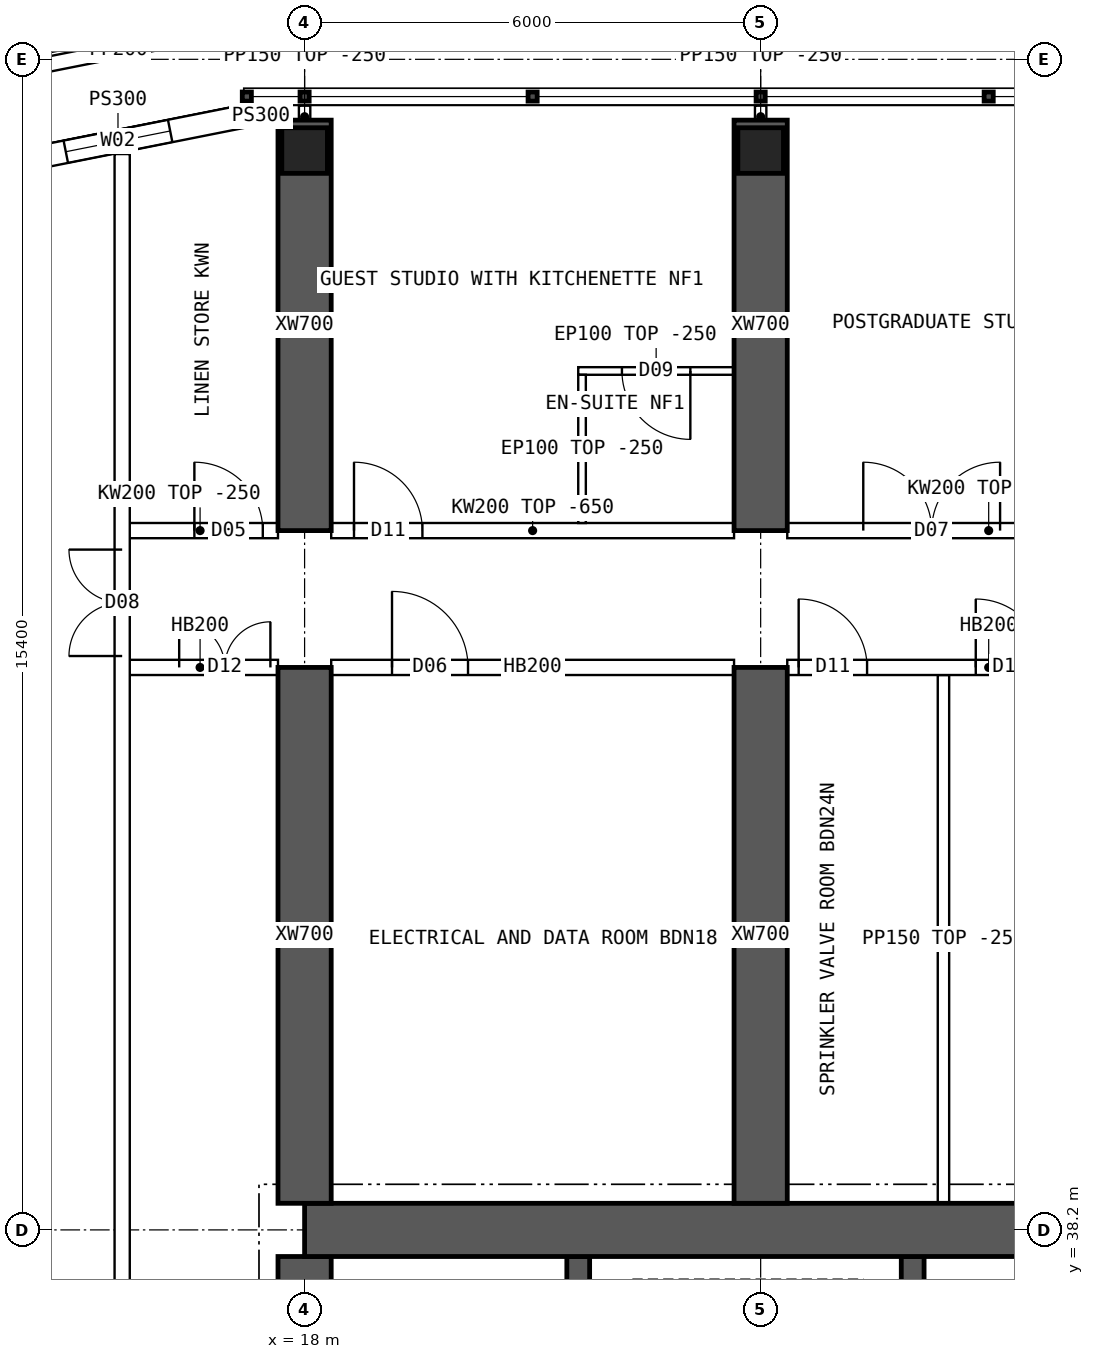
"""IFC4 building model, lengths in metres.
Left out: names, types, materials, properties, quantities, classifications, styles, units other than length and angle.
Written with IfcOpenShell. Run it as: python <this file> out.ifc"""

import sys

from ifc_helpers import new_model, si_unit, direction, frame, frame_2d, origin, origin_2d, place, context, subcontext, project, spatial, polyline, rectangle, hollow_rectangle, outline, extrude, element, fill, save


model = new_model("IFC4")
c1 = context("Model", 3, precision=1e-05, world=origin(), true_north=direction((0.0, 1.0)))
c2 = subcontext(c1, "Body", "Model", "MODEL_VIEW")
j1 = project(units=[si_unit("LENGTHUNIT", "METRE"), si_unit("PLANEANGLEUNIT", "RADIAN")], contexts=[c1])
p1 = place(None, origin())
s1 = spatial("IfcSite", under=j1, at=p1, CompositionType="ELEMENT")
p2 = place(p1, origin())
s2 = spatial("IfcBuilding", under=s1, at=p2, CompositionType="ELEMENT")
p3 = place(p2, frame((0.0, 0.0, 208.3)))
s3 = spatial("IfcBuildingStorey", under=s2, at=p3, CompositionType="ELEMENT", Elevation=208.3)
for number, where, z_axis, x_axis in (
    (1, (18.0, 52.4, 0.0), (0.0, 0.0, 1.0), (1.0, 0.0, 0.0)),
    (2, (24.0, 52.4, 0.0), (0.0, 0.0, 1.0), (1.0, 0.0, 0.0)),
):
    element("IfcColumn", number, at=place(p3, frame(where, z_axis=z_axis, x_axis=x_axis)), inside=s3, PredefinedType="COLUMN", context=c2, shape_type="SweptSolid", body=[
        extrude(hollow_rectangle(XDim=0.6, YDim=0.6, WallThickness=0.06, at=origin_2d()), origin(), (0.0, 0.0, 1.0), 4.5),
    ])
p4 = place(p3, frame((18.0, 38.2, 0.0), z_axis=(0.0, 0.0, 1.0), x_axis=(1.0, 0.0, 0.0)))
e3 = element("IfcWall", 3, at=p4, inside=s3, PredefinedType="SHEAR", context=c2, shape_type="SweptSolid", body=[
    extrude(rectangle(XDim=48.0, YDim=0.7, at=frame_2d((24.0, 0.0))), origin(), (0.0, 0.0, 1.0), 4.5),
])
p5 = place(p3, frame((18.0, 26.15, 0.0), z_axis=(0.0, 0.0, 1.0), x_axis=(0.0, 1.0, 0.0)))
e4 = element("IfcWall", 4, at=p5, inside=s3, PredefinedType="SHEAR", context=c2, shape_type="SweptSolid", body=[
    extrude(rectangle(XDim=11.7, YDim=0.7, at=frame_2d((5.85, 0.0))), origin(), (0.0, 0.0, 1.0), 4.5),
])
p6 = place(p5, frame((5.15, 0.0, 0.0)))
e5 = element("IfcOpeningElement", 5, at=p6, cuts=e4, PredefinedType="OPENING", context=c2, shape_type="SweptSolid", body=[
    extrude(rectangle(XDim=1.2, YDim=2.1, at=frame_2d((0.6, 1.05))), frame((0.0, 0.36, 0.0), z_axis=(0.0, -1.0, 0.0), x_axis=(1.0, 0.0, 0.0)), (0.0, 0.0, 1.0), 0.72),
])
for number, where, z_axis, x_axis in (
    (6, (21.6, 34.75, 0.0), (0.0, 0.0, 1.0), (0.0, 1.0, 0.0)),
    (7, (26.0, 34.75, 0.0), (0.0, 0.0, 1.0), (0.0, 1.0, 0.0)),
):
    element("IfcWall", number, at=place(p3, frame(where, z_axis=z_axis, x_axis=x_axis)), inside=s3, PredefinedType="SHEAR", context=c2, shape_type="SweptSolid", body=[
        extrude(rectangle(XDim=3.1, YDim=0.3, at=frame_2d((1.55, 0.0))), origin(), (0.0, 0.0, 1.0), 4.5),
    ])
p7 = place(p3, frame((18.0, 47.4, 0.0), z_axis=(0.0, 0.0, 1.0), x_axis=(0.0, 1.0, 0.0)))
e8 = element("IfcWall", 8, at=p7, inside=s3, PredefinedType="SHEAR", context=c2, shape_type="SweptSolid", body=[
    extrude(rectangle(XDim=5.4, YDim=0.7, at=frame_2d((2.7, 0.0))), origin(), (0.0, 0.0, 1.0), 4.5),
])
p8 = place(p3, frame((18.0, 38.55, 0.0), z_axis=(0.0, 0.0, 1.0), x_axis=(0.0, 1.0, 0.0)))
e9 = element("IfcWall", 9, at=p8, inside=s3, PredefinedType="SHEAR", context=c2, shape_type="SweptSolid", body=[
    extrude(rectangle(XDim=7.05, YDim=0.7, at=frame_2d((3.525, 0.0))), origin(), (0.0, 0.0, 1.0), 4.5),
])
p9 = place(p3, frame((24.0, 47.4, 0.0), z_axis=(0.0, 0.0, 1.0), x_axis=(0.0, 1.0, 0.0)))
e10 = element("IfcWall", 10, at=p9, inside=s3, PredefinedType="SHEAR", context=c2, shape_type="SweptSolid", body=[
    extrude(rectangle(XDim=5.4, YDim=0.7, at=frame_2d((2.7, 0.0))), origin(), (0.0, 0.0, 1.0), 4.5),
])
p10 = place(p3, frame((24.0, 38.55, 0.0), z_axis=(0.0, 0.0, 1.0), x_axis=(0.0, 1.0, 0.0)))
e11 = element("IfcWall", 11, at=p10, inside=s3, PredefinedType="SHEAR", context=c2, shape_type="SweptSolid", body=[
    extrude(rectangle(XDim=7.05, YDim=0.7, at=frame_2d((3.525, 0.0))), origin(), (0.0, 0.0, 1.0), 4.5),
])
p11 = place(p3, frame((17.2, 52.85, 0.0), z_axis=(0.0, 0.0, 1.0), x_axis=(-0.98078325777, -0.195100490205, 0.0)))
e12 = element("IfcWall", 12, at=p11, inside=s3, PredefinedType="SOLIDWALL", context=c2, shape_type="SweptSolid", body=[
    extrude(outline(polyline([(-0.03, -0.15), (3.405, -0.15), (3.345, 0.15), (0.03, 0.15), (-0.03, -0.15)])), origin(), (0.0, 0.0, 1.0), 4.25),
])
p12 = place(p11, frame((0.988, 0.0, 0.9)))
e13 = element("IfcOpeningElement", 13, at=p12, cuts=e12, PredefinedType="OPENING", context=c2, shape_type="SweptSolid", body=[
    extrude(rectangle(XDim=1.4, YDim=1.8, at=frame_2d((0.7, 0.9))), frame((0.0, 0.16, 0.0), z_axis=(0.0, -1.0, 0.0), x_axis=(1.0, 0.0, 0.0)), (0.0, 0.0, 1.0), 0.32),
])
p13 = place(p3, frame((17.2, 52.85, 0.0), z_axis=(0.0, 0.0, 1.0), x_axis=(1.0, 0.0, 0.0)))
e14 = element("IfcWall", 14, at=p13, inside=s3, PredefinedType="SOLIDWALL", context=c2, shape_type="SweptSolid", body=[
    extrude(rectangle(XDim=0.45, YDim=0.3, at=frame_2d((0.225, 0.0))), origin(), (0.0, 0.0, 1.0), 4.25),
])
p14 = place(p3, frame((13.891, 53.389, 0.0), z_axis=(0.0, 0.0, 1.0), x_axis=(0.980787925163, 0.195077025438, 0.0)))
e15 = element("IfcWall", 15, at=p14, inside=s3, PredefinedType="PARAPET", context=c2, shape_type="SweptSolid", body=[
    extrude(rectangle(XDim=3.389, YDim=0.2, at=frame_2d((1.695, 0.0))), origin(), (0.0, 0.0, 1.0), 1.1),
])
p15 = place(p3, frame((15.6, 47.4, 0.0), z_axis=(0.0, 0.0, 1.0), x_axis=(1.0, 0.0, 0.0)))
e16 = element("IfcWall", 16, at=p15, inside=s3, PredefinedType="SOLIDWALL", context=c2, shape_type="SweptSolid", body=[
    extrude(rectangle(XDim=2.05, YDim=0.2, at=frame_2d((1.025, 0.0))), origin(), (0.0, 0.0, 1.0), 4.25),
])
p16 = place(p15, frame((0.95, 0.0, 0.0)))
e17 = element("IfcOpeningElement", 17, at=p16, cuts=e16, PredefinedType="OPENING", context=c2, shape_type="SweptSolid", body=[
    extrude(rectangle(XDim=0.9, YDim=2.1, at=frame_2d((0.45, 1.05))), frame((0.0, 0.11, 0.0), z_axis=(0.0, -1.0, 0.0), x_axis=(1.0, 0.0, 0.0)), (0.0, 0.0, 1.0), 0.22),
])
p17 = place(p3, frame((15.6, 45.6, 0.0), z_axis=(0.0, 0.0, 1.0), x_axis=(1.0, 0.0, 0.0)))
e18 = element("IfcWall", 18, at=p17, inside=s3, PredefinedType="SOLIDWALL", context=c2, shape_type="SweptSolid", body=[
    extrude(rectangle(XDim=2.05, YDim=0.2, at=frame_2d((1.025, 0.0))), origin(), (0.0, 0.0, 1.0), 4.25),
])
p18 = place(p17, frame((0.75, 0.0, 0.0)))
e19 = element("IfcOpeningElement", 19, at=p18, cuts=e18, PredefinedType="OPENING", context=c2, shape_type="SweptSolid", body=[
    extrude(rectangle(XDim=1.2, YDim=2.1, at=frame_2d((0.6, 1.05))), frame((0.0, 0.11, 0.0), z_axis=(0.0, -1.0, 0.0), x_axis=(1.0, 0.0, 0.0)), (0.0, 0.0, 1.0), 0.22),
])
p19 = place(p3, frame((18.35, 47.4, 0.0), z_axis=(0.0, 0.0, 1.0), x_axis=(1.0, 0.0, 0.0)))
e20 = element("IfcWall", 20, at=p19, inside=s3, PredefinedType="SOLIDWALL", context=c2, shape_type="SweptSolid", body=[
    extrude(outline(polyline([(0.0, 0.0), (5.3, 0.0), (5.3, 3.85), (0.0, 3.85), (0.0, 0.0)])), frame((0.0, 0.1, 0.0), z_axis=(0.0, -1.0, 0.0), x_axis=(1.0, 0.0, 0.0)), (0.0, 0.0, 1.0), 0.2),
])
p20 = place(p19, frame((0.3, 0.0, 0.0)))
e21 = element("IfcOpeningElement", 21, at=p20, cuts=e20, PredefinedType="OPENING", context=c2, shape_type="SweptSolid", body=[
    extrude(rectangle(XDim=0.9, YDim=2.1, at=frame_2d((0.45, 1.05))), frame((0.0, 0.11, 0.0), z_axis=(0.0, -1.0, 0.0), x_axis=(1.0, 0.0, 0.0)), (0.0, 0.0, 1.0), 0.22),
])
p21 = place(p3, frame((18.35, 45.6, 0.0), z_axis=(0.0, 0.0, 1.0), x_axis=(1.0, 0.0, 0.0)))
e22 = element("IfcWall", 22, at=p21, inside=s3, PredefinedType="SOLIDWALL", context=c2, shape_type="SweptSolid", body=[
    extrude(rectangle(XDim=5.3, YDim=0.2, at=frame_2d((2.65, 0.0))), origin(), (0.0, 0.0, 1.0), 4.25),
])
p22 = place(p21, frame((0.8, 0.0, 0.0)))
e23 = element("IfcOpeningElement", 23, at=p22, cuts=e22, PredefinedType="OPENING", context=c2, shape_type="SweptSolid", body=[
    extrude(rectangle(XDim=1.0, YDim=2.1, at=frame_2d((0.5, 1.05))), frame((0.0, 0.11, 0.0), z_axis=(0.0, -1.0, 0.0), x_axis=(1.0, 0.0, 0.0)), (0.0, 0.0, 1.0), 0.22),
])
p23 = place(p3, frame((24.35, 47.4, 0.0), z_axis=(0.0, 0.0, 1.0), x_axis=(1.0, 0.0, 0.0)))
e24 = element("IfcWall", 24, at=p23, inside=s3, PredefinedType="SOLIDWALL", context=c2, shape_type="SweptSolid", body=[
    extrude(outline(polyline([(0.0, 0.0), (5.3, 0.0), (5.3, 3.85), (0.0, 3.85), (0.0, 0.0)])), frame((0.0, 0.1, 0.0), z_axis=(0.0, -1.0, 0.0), x_axis=(1.0, 0.0, 0.0)), (0.0, 0.0, 1.0), 0.2),
])
p24 = place(p23, frame((1.0, 0.0, 0.0)))
e25 = element("IfcOpeningElement", 25, at=p24, cuts=e24, PredefinedType="OPENING", context=c2, shape_type="SweptSolid", body=[
    extrude(rectangle(XDim=1.8, YDim=2.1, at=frame_2d((0.9, 1.05))), frame((0.0, 0.11, 0.0), z_axis=(0.0, -1.0, 0.0), x_axis=(1.0, 0.0, 0.0)), (0.0, 0.0, 1.0), 0.22),
])
p25 = place(p3, frame((24.35, 45.6, 0.0), z_axis=(0.0, 0.0, 1.0), x_axis=(1.0, 0.0, 0.0)))
e26 = element("IfcWall", 26, at=p25, inside=s3, PredefinedType="SOLIDWALL", context=c2, shape_type="SweptSolid", body=[
    extrude(rectangle(XDim=5.3, YDim=0.2, at=frame_2d((2.65, 0.0))), origin(), (0.0, 0.0, 1.0), 4.25),
])
p26 = place(p25, frame((0.15, 0.0, 0.0)))
e27 = element("IfcOpeningElement", 27, at=p26, cuts=e26, PredefinedType="OPENING", context=c2, shape_type="SweptSolid", body=[
    extrude(rectangle(XDim=0.9, YDim=2.1, at=frame_2d((0.45, 1.05))), frame((0.0, 0.11, 0.0), z_axis=(0.0, -1.0, 0.0), x_axis=(1.0, 0.0, 0.0)), (0.0, 0.0, 1.0), 0.22),
])
p27 = place(p25, frame((2.48, 0.0, 0.0)))
e28 = element("IfcOpeningElement", 28, at=p27, cuts=e26, PredefinedType="OPENING", context=c2, shape_type="SweptSolid", body=[
    extrude(rectangle(XDim=0.9, YDim=2.1, at=frame_2d((0.45, 1.05))), frame((0.0, 0.11, 0.0), z_axis=(0.0, -1.0, 0.0), x_axis=(1.0, 0.0, 0.0)), (0.0, 0.0, 1.0), 0.22),
])
p28 = place(p3, frame((21.6, 49.5, 0.0), z_axis=(0.0, 0.0, 1.0), x_axis=(1.0, 0.0, 0.0)))
e29 = element("IfcWall", 29, at=p28, inside=s3, PredefinedType="PARTITIONING", context=c2, shape_type="SweptSolid", body=[
    extrude(rectangle(XDim=2.05, YDim=0.1, at=frame_2d((1.025, 0.0))), origin(), (0.0, 0.0, 1.0), 4.25),
])
p29 = place(p28, frame((0.575, 0.0, 0.0)))
e30 = element("IfcOpeningElement", 30, at=p29, cuts=e29, PredefinedType="OPENING", context=c2, shape_type="SweptSolid", body=[
    extrude(rectangle(XDim=0.9, YDim=2.1, at=frame_2d((0.45, 1.05))), frame((0.0, 0.06, 0.0), z_axis=(0.0, -1.0, 0.0), x_axis=(1.0, 0.0, 0.0)), (0.0, 0.0, 1.0), 0.12),
])
p30 = place(p3, frame((21.65, 49.45, 0.0), z_axis=(0.0, 0.0, 1.0), x_axis=(0.0, -1.0, 0.0)))
e31 = element("IfcWall", 31, at=p30, inside=s3, PredefinedType="PARTITIONING", context=c2, shape_type="SweptSolid", body=[
    extrude(outline(polyline([(0.0, 0.0), (1.95, 0.0), (1.95, 3.85), (1.902, 3.85), (1.9, 4.25), (0.0, 4.25), (0.0, 0.0)])), frame((0.0, 0.05, 0.0), z_axis=(0.0, -1.0, 0.0), x_axis=(1.0, 0.0, 0.0)), (0.0, 0.0, 1.0), 0.1),
])
p31 = place(p3, frame((26.405, 38.55, 0.0), z_axis=(0.0, 0.0, 1.0), x_axis=(0.0, 1.0, 0.0)))
e32 = element("IfcWall", 32, at=p31, inside=s3, PredefinedType="PARTITIONING", context=c2, shape_type="SweptSolid", body=[
    extrude(rectangle(XDim=6.95, YDim=0.15, at=frame_2d((3.475, 0.0))), origin(), (0.0, 0.0, 1.0), 4.25),
])
p32 = place(p3, frame((15.6, 11.646, 0.0), z_axis=(0.0, 0.0, 1.0), x_axis=(0.0, 1.0, 0.0)))
e33 = element("IfcWall", 33, at=p32, inside=s3, PredefinedType="SOLIDWALL", context=c2, shape_type="SweptSolid", body=[
    extrude(rectangle(XDim=40.708, YDim=0.2, at=frame_2d((20.354, 0.0))), origin(), (0.0, 0.0, 1.0), 4.25),
])
p33 = place(p32, frame((13.434, 0.0, 0.0)))
e34 = element("IfcOpeningElement", 34, at=p33, cuts=e33, PredefinedType="OPENING", context=c2, shape_type="SweptSolid", body=[
    extrude(rectangle(XDim=1.2, YDim=2.1, at=frame_2d((0.6, 1.05))), frame((0.0, 0.11, 0.0), z_axis=(0.0, -1.0, 0.0), x_axis=(1.0, 0.0, 0.0)), (0.0, 0.0, 1.0), 0.22),
])
p34 = place(p32, frame((21.194, 0.0, 0.0)))
e35 = element("IfcOpeningElement", 35, at=p34, cuts=e33, PredefinedType="OPENING", context=c2, shape_type="SweptSolid", body=[
    extrude(rectangle(XDim=1.2, YDim=2.1, at=frame_2d((0.6, 1.05))), frame((0.0, 0.11, 0.0), z_axis=(0.0, -1.0, 0.0), x_axis=(1.0, 0.0, 0.0)), (0.0, 0.0, 1.0), 0.22),
])
p35 = place(p32, frame((5.104, 0.0, 0.0)))
e36 = element("IfcOpeningElement", 36, at=p35, cuts=e33, PredefinedType="OPENING", context=c2, shape_type="SweptSolid", body=[
    extrude(rectangle(XDim=1.4, YDim=2.1, at=frame_2d((0.7, 1.05))), frame((0.0, 0.11, 0.0), z_axis=(0.0, -1.0, 0.0), x_axis=(1.0, 0.0, 0.0)), (0.0, 0.0, 1.0), 0.22),
])
p36 = place(p32, frame((34.104, 0.0, 0.0)))
e37 = element("IfcOpeningElement", 37, at=p36, cuts=e33, PredefinedType="OPENING", context=c2, shape_type="SweptSolid", body=[
    extrude(rectangle(XDim=1.4, YDim=2.1, at=frame_2d((0.7, 1.05))), frame((0.0, 0.11, 0.0), z_axis=(0.0, -1.0, 0.0), x_axis=(1.0, 0.0, 0.0)), (0.0, 0.0, 1.0), 0.22),
])
for number, where, z_axis, x_axis in (
    (38, (18.0, 52.7, 0.0), (0.0, 0.0, 1.0), (0.0, 1.0, 0.0)),
    (39, (24.0, 52.7, 0.0), (0.0, 0.0, 1.0), (0.0, 1.0, 0.0)),
):
    element("IfcWall", number, at=place(p3, frame(where, z_axis=z_axis, x_axis=x_axis)), inside=s3, PredefinedType="PARTITIONING", context=c2, shape_type="SweptSolid", body=[
        extrude(rectangle(XDim=0.29, YDim=0.15, at=frame_2d((0.145, 0.0))), origin(), (0.0, 0.0, 1.0), 4.25),
    ])
p37 = place(p12, origin())
e40 = element("IfcWindow", 40, at=p37, inside=s3, PartitioningType="SINGLE_PANEL", PredefinedType="WINDOW", context=c2, shape_type="SweptSolid", body=[
    extrude(rectangle(XDim=1.4, YDim=1.8, at=frame_2d((0.7, 0.9))), frame((0.0, 0.03, 0.0), z_axis=(0.0, -1.0, 0.0), x_axis=(1.0, 0.0, 0.0)), (0.0, 0.0, 1.0), 0.06),
])
fill(e13, e40)
p38 = place(p18, origin())
e41 = element("IfcDoor", 41, at=p38, inside=s3, OperationType="DOUBLE_DOOR_SINGLE_SWING", PredefinedType="DOOR", context=c2, shape_type="SweptSolid", body=[
    extrude(rectangle(XDim=1.2, YDim=2.1, at=frame_2d((0.6, 1.05))), frame((0.0, 0.025, 0.0), z_axis=(0.0, -1.0, 0.0), x_axis=(1.0, 0.0, 0.0)), (0.0, 0.0, 1.0), 0.05),
])
fill(e19, e41)
p39 = place(p29, origin())
e42 = element("IfcDoor", 42, at=p39, inside=s3, OperationType="SINGLE_SWING_RIGHT", PredefinedType="DOOR", context=c2, shape_type="SweptSolid", body=[
    extrude(rectangle(XDim=0.9, YDim=2.1, at=frame_2d((0.45, 1.05))), frame((0.0, 0.025, 0.0), z_axis=(0.0, -1.0, 0.0), x_axis=(1.0, 0.0, 0.0)), (0.0, 0.0, 1.0), 0.05),
])
fill(e30, e42)
p40 = place(p20, origin())
e43 = element("IfcDoor", 43, at=p40, inside=s3, OperationType="SINGLE_SWING_LEFT", PredefinedType="DOOR", context=c2, shape_type="SweptSolid", body=[
    extrude(rectangle(XDim=0.9, YDim=2.1, at=frame_2d((0.45, 1.05))), frame((0.0, 0.025, 0.0), z_axis=(0.0, -1.0, 0.0), x_axis=(1.0, 0.0, 0.0)), (0.0, 0.0, 1.0), 0.05),
])
fill(e21, e43)
p41 = place(p24, origin())
e44 = element("IfcDoor", 44, at=p41, inside=s3, OperationType="DOUBLE_DOOR_SINGLE_SWING", PredefinedType="DOOR", context=c2, shape_type="SweptSolid", body=[
    extrude(rectangle(XDim=1.8, YDim=2.1, at=frame_2d((0.9, 1.05))), frame((0.0, 0.025, 0.0), z_axis=(0.0, -1.0, 0.0), x_axis=(1.0, 0.0, 0.0)), (0.0, 0.0, 1.0), 0.05),
])
fill(e25, e44)
p42 = place(p22, origin())
e45 = element("IfcDoor", 45, at=p42, inside=s3, OperationType="SINGLE_SWING_LEFT", PredefinedType="DOOR", context=c2, shape_type="SweptSolid", body=[
    extrude(rectangle(XDim=1.0, YDim=2.1, at=frame_2d((0.5, 1.05))), frame((0.0, 0.025, 0.0), z_axis=(0.0, -1.0, 0.0), x_axis=(1.0, 0.0, 0.0)), (0.0, 0.0, 1.0), 0.05),
])
fill(e23, e45)
p43 = place(p26, origin())
e46 = element("IfcDoor", 46, at=p43, inside=s3, OperationType="SINGLE_SWING_LEFT", PredefinedType="DOOR", context=c2, shape_type="SweptSolid", body=[
    extrude(rectangle(XDim=0.9, YDim=2.1, at=frame_2d((0.45, 1.05))), frame((0.0, 0.025, 0.0), z_axis=(0.0, -1.0, 0.0), x_axis=(1.0, 0.0, 0.0)), (0.0, 0.0, 1.0), 0.05),
])
fill(e27, e46)
p44 = place(p27, origin())
e47 = element("IfcDoor", 47, at=p44, inside=s3, OperationType="SINGLE_SWING_LEFT", PredefinedType="DOOR", context=c2, shape_type="SweptSolid", body=[
    extrude(rectangle(XDim=0.9, YDim=2.1, at=frame_2d((0.45, 1.05))), frame((0.0, 0.025, 0.0), z_axis=(0.0, -1.0, 0.0), x_axis=(1.0, 0.0, 0.0)), (0.0, 0.0, 1.0), 0.05),
])
fill(e28, e47)
p45 = place(p36, origin())
e48 = element("IfcDoor", 48, at=p45, inside=s3, OperationType="DOUBLE_DOOR_SINGLE_SWING", PredefinedType="DOOR", context=c2, shape_type="SweptSolid", body=[
    extrude(rectangle(XDim=1.4, YDim=2.1, at=frame_2d((0.7, 1.05))), frame((0.0, 0.025, 0.0), z_axis=(0.0, -1.0, 0.0), x_axis=(1.0, 0.0, 0.0)), (0.0, 0.0, 1.0), 0.05),
])
fill(e37, e48)
p46 = place(p16, origin())
e49 = element("IfcDoor", 49, at=p46, inside=s3, OperationType="SINGLE_SWING_LEFT", PredefinedType="DOOR", context=c2, shape_type="SweptSolid", body=[
    extrude(rectangle(XDim=0.9, YDim=2.1, at=frame_2d((0.45, 1.05))), frame((0.0, 0.025, 0.0), z_axis=(0.0, -1.0, 0.0), x_axis=(1.0, 0.0, 0.0)), (0.0, 0.0, 1.0), 0.05),
])
fill(e17, e49)
save(model, sys.argv[1])
